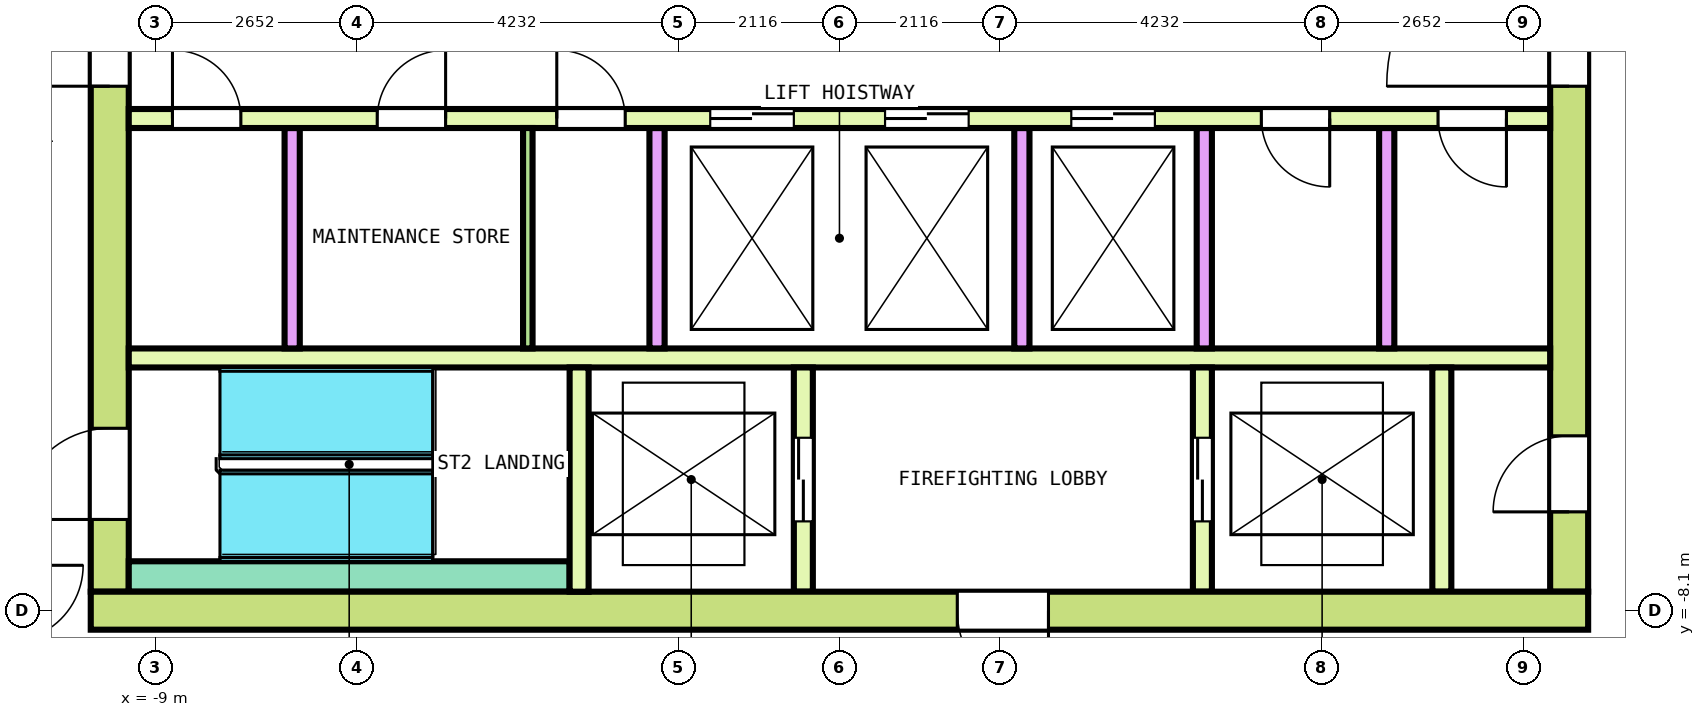
"""IFC4 building model, lengths in metres.
Left out: names, types, materials, properties, quantities, classifications, styles, units other than length and angle.
Written with IfcOpenShell. Run it as: python <this file> out.ifc"""

import sys

from ifc_helpers import new_model, si_unit, direction, frame, frame_2d, origin, place, context, subcontext, project, spatial, rectangle, extrude, element, fill, save


model = new_model("IFC4")
c1 = context("Model", 3, precision=1e-05, world=origin(), true_north=direction((0.0, 1.0)))
c2 = subcontext(c1, "Body", "Model", "MODEL_VIEW")
j1 = project(units=[si_unit("LENGTHUNIT", "METRE"), si_unit("PLANEANGLEUNIT", "RADIAN")], contexts=[c1])
p1 = place(None, origin())
s1 = spatial("IfcSite", under=j1, at=p1, CompositionType="ELEMENT")
p2 = place(p1, origin())
s2 = spatial("IfcBuilding", under=s1, at=p2, CompositionType="ELEMENT")
p3 = place(p2, frame((0.0, 0.0, 308.6)))
s3 = spatial("IfcBuildingStorey", under=s2, at=p3, CompositionType="ELEMENT", Elevation=308.6)
p4 = place(p3, frame((-9.85, -8.1, 0.0), z_axis=(0.0, 0.0, 1.0), x_axis=(1.0, 0.0, 0.0)))
e1 = element("IfcWall", 1, at=p4, inside=s3, PredefinedType="SHEAR", context=c2, shape_type="SweptSolid", body=[
    extrude(rectangle(XDim=19.7, YDim=0.5, at=frame_2d((9.85, 0.0))), origin(), (0.0, 0.0, 1.0), 3.7),
])
p5 = place(p4, frame((11.4, 0.0, 0.0)))
e2 = element("IfcOpeningElement", 2, at=p5, cuts=e1, PredefinedType="OPENING", context=c2, shape_type="SweptSolid", body=[
    extrude(rectangle(XDim=1.2, YDim=2.1, at=frame_2d((0.6, 1.05))), frame((0.0, 0.26, 0.0), z_axis=(0.0, -1.0, 0.0), x_axis=(1.0, 0.0, 0.0)), (0.0, 0.0, 1.0), 0.52),
])
p6 = place(p3, frame((-9.6, -7.85, 0.0), z_axis=(0.0, 0.0, 1.0), x_axis=(0.0, 1.0, 0.0)))
e3 = element("IfcWall", 3, at=p6, inside=s3, PredefinedType="SHEAR", context=c2, shape_type="SweptSolid", body=[
    extrude(rectangle(XDim=15.7, YDim=0.5, at=frame_2d((7.85, 0.0))), origin(), (0.0, 0.0, 1.0), 3.7),
])
p7 = place(p6, frame((6.65, 0.0, 0.0)))
e4 = element("IfcOpeningElement", 4, at=p7, cuts=e3, PredefinedType="OPENING", context=c2, shape_type="SweptSolid", body=[
    extrude(rectangle(XDim=2.4, YDim=2.1, at=frame_2d((1.2, 1.05))), frame((0.0, 0.26, 0.0), z_axis=(0.0, -1.0, 0.0), x_axis=(1.0, 0.0, 0.0)), (0.0, 0.0, 1.0), 0.52),
])
p8 = place(p6, frame((13.55, 0.0, 0.0)))
e5 = element("IfcOpeningElement", 5, at=p8, cuts=e3, PredefinedType="OPENING", context=c2, shape_type="SweptSolid", body=[
    extrude(rectangle(XDim=1.2, YDim=2.1, at=frame_2d((0.6, 1.05))), frame((0.0, 0.26, 0.0), z_axis=(0.0, -1.0, 0.0), x_axis=(1.0, 0.0, 0.0)), (0.0, 0.0, 1.0), 0.52),
])
p9 = place(p6, frame((0.95, 0.0, 0.0)))
e6 = element("IfcOpeningElement", 6, at=p9, cuts=e3, PredefinedType="OPENING", context=c2, shape_type="SweptSolid", body=[
    extrude(rectangle(XDim=1.2, YDim=2.1, at=frame_2d((0.6, 1.05))), frame((0.0, 0.26, 0.0), z_axis=(0.0, -1.0, 0.0), x_axis=(1.0, 0.0, 0.0)), (0.0, 0.0, 1.0), 0.52),
])
p10 = place(p3, frame((9.6, -7.85, 0.0), z_axis=(0.0, 0.0, 1.0), x_axis=(0.0, 1.0, 0.0)))
e7 = element("IfcWall", 7, at=p10, inside=s3, PredefinedType="SHEAR", context=c2, shape_type="SweptSolid", body=[
    extrude(rectangle(XDim=15.7, YDim=0.5, at=frame_2d((7.85, 0.0))), origin(), (0.0, 0.0, 1.0), 3.7),
])
p11 = place(p10, frame((6.65, 0.0, 0.0)))
e8 = element("IfcOpeningElement", 8, at=p11, cuts=e7, PredefinedType="OPENING", context=c2, shape_type="SweptSolid", body=[
    extrude(rectangle(XDim=2.4, YDim=2.1, at=frame_2d((1.2, 1.05))), frame((0.0, 0.26, 0.0), z_axis=(0.0, -1.0, 0.0), x_axis=(1.0, 0.0, 0.0)), (0.0, 0.0, 1.0), 0.52),
])
p12 = place(p10, frame((13.55, 0.0, 0.0)))
e9 = element("IfcOpeningElement", 9, at=p12, cuts=e7, PredefinedType="OPENING", context=c2, shape_type="SweptSolid", body=[
    extrude(rectangle(XDim=1.2, YDim=2.1, at=frame_2d((0.6, 1.05))), frame((0.0, 0.26, 0.0), z_axis=(0.0, -1.0, 0.0), x_axis=(1.0, 0.0, 0.0)), (0.0, 0.0, 1.0), 0.52),
])
p13 = place(p10, frame((1.05, 0.0, 0.0)))
e10 = element("IfcOpeningElement", 10, at=p13, cuts=e7, PredefinedType="OPENING", context=c2, shape_type="SweptSolid", body=[
    extrude(rectangle(XDim=1.0, YDim=2.1, at=frame_2d((0.5, 1.05))), frame((0.0, 0.26, 0.0), z_axis=(0.0, -1.0, 0.0), x_axis=(1.0, 0.0, 0.0)), (0.0, 0.0, 1.0), 0.52),
])
p14 = place(p3, frame((-9.35, -1.625, 0.0), z_axis=(0.0, 0.0, 1.0), x_axis=(1.0, 0.0, 0.0)))
e11 = element("IfcWall", 11, at=p14, inside=s3, PredefinedType="SOLIDWALL", context=c2, shape_type="SweptSolid", body=[
    extrude(rectangle(XDim=18.7, YDim=0.25, at=frame_2d((9.35, 0.0))), origin(), (0.0, 0.0, 1.0), 3.7),
])
p15 = place(p14, frame((7.65, 0.0, 0.0)))
e12 = element("IfcOpeningElement", 12, at=p15, cuts=e11, PredefinedType="OPENING", context=c2, shape_type="SweptSolid", body=[
    extrude(rectangle(XDim=1.1, YDim=2.1, at=frame_2d((0.55, 1.05))), frame((0.0, 0.135, 0.0), z_axis=(0.0, -1.0, 0.0), x_axis=(1.0, 0.0, 0.0)), (0.0, 0.0, 1.0), 0.27),
])
p16 = place(p14, frame((9.95, 0.0, 0.0)))
e13 = element("IfcOpeningElement", 13, at=p16, cuts=e11, PredefinedType="OPENING", context=c2, shape_type="SweptSolid", body=[
    extrude(rectangle(XDim=1.1, YDim=2.1, at=frame_2d((0.55, 1.05))), frame((0.0, 0.135, 0.0), z_axis=(0.0, -1.0, 0.0), x_axis=(1.0, 0.0, 0.0)), (0.0, 0.0, 1.0), 0.27),
])
p17 = place(p14, frame((12.4, 0.0, 0.0)))
e14 = element("IfcOpeningElement", 14, at=p17, cuts=e11, PredefinedType="OPENING", context=c2, shape_type="SweptSolid", body=[
    extrude(rectangle(XDim=1.1, YDim=2.1, at=frame_2d((0.55, 1.05))), frame((0.0, 0.135, 0.0), z_axis=(0.0, -1.0, 0.0), x_axis=(1.0, 0.0, 0.0)), (0.0, 0.0, 1.0), 0.27),
])
p18 = place(p14, frame((0.575, 0.0, 0.0)))
e15 = element("IfcOpeningElement", 15, at=p18, cuts=e11, PredefinedType="OPENING", context=c2, shape_type="SweptSolid", body=[
    extrude(rectangle(XDim=0.9, YDim=2.1, at=frame_2d((0.45, 1.05))), frame((0.0, 0.135, 0.0), z_axis=(0.0, -1.0, 0.0), x_axis=(1.0, 0.0, 0.0)), (0.0, 0.0, 1.0), 0.27),
])
p19 = place(p14, frame((3.269, 0.0, 0.0)))
e16 = element("IfcOpeningElement", 16, at=p19, cuts=e11, PredefinedType="OPENING", context=c2, shape_type="SweptSolid", body=[
    extrude(rectangle(XDim=0.9, YDim=2.1, at=frame_2d((0.45, 1.05))), frame((0.0, 0.135, 0.0), z_axis=(0.0, -1.0, 0.0), x_axis=(1.0, 0.0, 0.0)), (0.0, 0.0, 1.0), 0.27),
])
p20 = place(p14, frame((5.631, 0.0, 0.0)))
e17 = element("IfcOpeningElement", 17, at=p20, cuts=e11, PredefinedType="OPENING", context=c2, shape_type="SweptSolid", body=[
    extrude(rectangle(XDim=0.9, YDim=2.1, at=frame_2d((0.45, 1.05))), frame((0.0, 0.135, 0.0), z_axis=(0.0, -1.0, 0.0), x_axis=(1.0, 0.0, 0.0)), (0.0, 0.0, 1.0), 0.27),
])
p21 = place(p14, frame((14.9, 0.0, 0.0)))
e18 = element("IfcOpeningElement", 18, at=p21, cuts=e11, PredefinedType="OPENING", context=c2, shape_type="SweptSolid", body=[
    extrude(rectangle(XDim=0.9, YDim=2.1, at=frame_2d((0.45, 1.05))), frame((0.0, 0.135, 0.0), z_axis=(0.0, -1.0, 0.0), x_axis=(1.0, 0.0, 0.0)), (0.0, 0.0, 1.0), 0.27),
])
p22 = place(p14, frame((17.225, 0.0, 0.0)))
e19 = element("IfcOpeningElement", 19, at=p22, cuts=e11, PredefinedType="OPENING", context=c2, shape_type="SweptSolid", body=[
    extrude(rectangle(XDim=0.9, YDim=2.1, at=frame_2d((0.45, 1.05))), frame((0.0, 0.135, 0.0), z_axis=(0.0, -1.0, 0.0), x_axis=(1.0, 0.0, 0.0)), (0.0, 0.0, 1.0), 0.27),
])
p23 = place(p3, frame((-9.35, -4.775, 0.0), z_axis=(0.0, 0.0, 1.0), x_axis=(1.0, 0.0, 0.0)))
e20 = element("IfcWall", 20, at=p23, inside=s3, PredefinedType="SOLIDWALL", context=c2, shape_type="SweptSolid", body=[
    extrude(rectangle(XDim=18.7, YDim=0.25, at=frame_2d((9.35, 0.0))), origin(), (0.0, 0.0, 1.0), 3.7),
])
for number, where, z_axis, x_axis in (
    (21, (-7.2, -4.65, 0.0), (0.0, 0.0, 1.0), (0.0, 1.0, 0.0)),
    (22, (-2.4, -4.65, 0.0), (0.0, 0.0, 1.0), (0.0, 1.0, 0.0)),
    (23, (2.4, -4.65, 0.0), (0.0, 0.0, 1.0), (0.0, 1.0, 0.0)),
    (24, (4.8, -4.65, 0.0), (0.0, 0.0, 1.0), (0.0, 1.0, 0.0)),
    (25, (7.2, -4.65, 0.0), (0.0, 0.0, 1.0), (0.0, 1.0, 0.0)),
):
    element("IfcWall", number, at=place(p3, frame(where, z_axis=z_axis, x_axis=x_axis)), inside=s3, PredefinedType="SOLIDWALL", context=c2, shape_type="SweptSolid", body=[
        extrude(rectangle(XDim=2.9, YDim=0.2, at=frame_2d((1.45, 0.0))), origin(), (0.0, 0.0, 1.0), 3.7),
    ])
p24 = place(p3, frame((-9.35, -7.65, 0.0), z_axis=(0.0, 0.0, 1.0), x_axis=(1.0, 0.0, 0.0)))
e26 = element("IfcWall", 26, at=p24, inside=s3, PredefinedType="SOLIDWALL", context=c2, shape_type="SweptSolid", body=[
    extrude(rectangle(XDim=5.8, YDim=0.4, at=frame_2d((2.9, 0.0))), origin(), (0.0, 0.0, 1.0), 3.7),
])
p25 = place(p3, frame((-3.425, -7.85, 0.0), z_axis=(0.0, 0.0, 1.0), x_axis=(0.0, 1.0, 0.0)))
e27 = element("IfcWall", 27, at=p25, inside=s3, PredefinedType="SOLIDWALL", context=c2, shape_type="SweptSolid", body=[
    extrude(rectangle(XDim=2.95, YDim=0.25, at=frame_2d((1.475, 0.0))), origin(), (0.0, 0.0, 1.0), 3.7),
])
p26 = place(p3, frame((-0.475, -7.85, 0.0), z_axis=(0.0, 0.0, 1.0), x_axis=(0.0, 1.0, 0.0)))
e28 = element("IfcWall", 28, at=p26, inside=s3, PredefinedType="SOLIDWALL", context=c2, shape_type="SweptSolid", body=[
    extrude(rectangle(XDim=2.95, YDim=0.25, at=frame_2d((1.475, 0.0))), origin(), (0.0, 0.0, 1.0), 3.7),
])
p27 = place(p26, frame((0.925, 0.0, 0.0)))
e29 = element("IfcOpeningElement", 29, at=p27, cuts=e28, PredefinedType="OPENING", context=c2, shape_type="SweptSolid", body=[
    extrude(rectangle(XDim=1.1, YDim=2.1, at=frame_2d((0.55, 1.05))), frame((0.0, 0.135, 0.0), z_axis=(0.0, -1.0, 0.0), x_axis=(1.0, 0.0, 0.0)), (0.0, 0.0, 1.0), 0.27),
])
p28 = place(p3, frame((4.775, -7.85, 0.0), z_axis=(0.0, 0.0, 1.0), x_axis=(0.0, 1.0, 0.0)))
e30 = element("IfcWall", 30, at=p28, inside=s3, PredefinedType="SOLIDWALL", context=c2, shape_type="SweptSolid", body=[
    extrude(rectangle(XDim=2.95, YDim=0.25, at=frame_2d((1.475, 0.0))), origin(), (0.0, 0.0, 1.0), 3.7),
])
p29 = place(p28, frame((0.925, 0.0, 0.0)))
e31 = element("IfcOpeningElement", 31, at=p29, cuts=e30, PredefinedType="OPENING", context=c2, shape_type="SweptSolid", body=[
    extrude(rectangle(XDim=1.1, YDim=2.1, at=frame_2d((0.55, 1.05))), frame((0.0, 0.135, 0.0), z_axis=(0.0, -1.0, 0.0), x_axis=(1.0, 0.0, 0.0)), (0.0, 0.0, 1.0), 0.27),
])
p30 = place(p3, frame((7.925, -7.85, 0.0), z_axis=(0.0, 0.0, 1.0), x_axis=(0.0, 1.0, 0.0)))
e32 = element("IfcWall", 32, at=p30, inside=s3, PredefinedType="SOLIDWALL", context=c2, shape_type="SweptSolid", body=[
    extrude(rectangle(XDim=2.95, YDim=0.25, at=frame_2d((1.475, 0.0))), origin(), (0.0, 0.0, 1.0), 3.7),
])
p31 = place(p3, frame((-4.1, -4.65, 0.0), z_axis=(0.0, 0.0, 1.0), x_axis=(0.0, 1.0, 0.0)))
e33 = element("IfcWall", 33, at=p31, inside=s3, PredefinedType="PARTITIONING", context=c2, shape_type="SweptSolid", body=[
    extrude(rectangle(XDim=2.9, YDim=0.125, at=frame_2d((1.45, 0.0))), origin(), (0.0, 0.0, 1.0), 3.7),
])
p32 = place(p15, origin())
e34 = element("IfcDoor", 34, at=p32, inside=s3, OperationType="DOUBLE_DOOR_SLIDING", PredefinedType="DOOR", context=c2, shape_type="SweptSolid", body=[
    extrude(rectangle(XDim=1.1, YDim=2.1, at=frame_2d((0.55, 1.05))), frame((0.0, 0.075, 0.0), z_axis=(0.0, -1.0, 0.0), x_axis=(1.0, 0.0, 0.0)), (0.0, 0.0, 1.0), 0.15),
])
fill(e12, e34)
p33 = place(p16, origin())
e35 = element("IfcDoor", 35, at=p33, inside=s3, OperationType="DOUBLE_DOOR_SLIDING", PredefinedType="DOOR", context=c2, shape_type="SweptSolid", body=[
    extrude(rectangle(XDim=1.1, YDim=2.1, at=frame_2d((0.55, 1.05))), frame((0.0, 0.075, 0.0), z_axis=(0.0, -1.0, 0.0), x_axis=(1.0, 0.0, 0.0)), (0.0, 0.0, 1.0), 0.15),
])
fill(e13, e35)
p34 = place(p17, origin())
e36 = element("IfcDoor", 36, at=p34, inside=s3, OperationType="DOUBLE_DOOR_SLIDING", PredefinedType="DOOR", context=c2, shape_type="SweptSolid", body=[
    extrude(rectangle(XDim=1.1, YDim=2.1, at=frame_2d((0.55, 1.05))), frame((0.0, 0.075, 0.0), z_axis=(0.0, -1.0, 0.0), x_axis=(1.0, 0.0, 0.0)), (0.0, 0.0, 1.0), 0.15),
])
fill(e14, e36)
p35 = place(p27, origin())
e37 = element("IfcDoor", 37, at=p35, inside=s3, OperationType="DOUBLE_DOOR_SLIDING", PredefinedType="DOOR", context=c2, shape_type="SweptSolid", body=[
    extrude(rectangle(XDim=1.1, YDim=2.1, at=frame_2d((0.55, 1.05))), frame((0.0, 0.075, 0.0), z_axis=(0.0, -1.0, 0.0), x_axis=(1.0, 0.0, 0.0)), (0.0, 0.0, 1.0), 0.15),
])
fill(e29, e37)
p36 = place(p29, origin())
e38 = element("IfcDoor", 38, at=p36, inside=s3, OperationType="DOUBLE_DOOR_SLIDING", PredefinedType="DOOR", context=c2, shape_type="SweptSolid", body=[
    extrude(rectangle(XDim=1.1, YDim=2.1, at=frame_2d((0.55, 1.05))), frame((0.0, 0.075, 0.0), z_axis=(0.0, -1.0, 0.0), x_axis=(1.0, 0.0, 0.0)), (0.0, 0.0, 1.0), 0.15),
])
fill(e31, e38)
p37 = place(p7, origin())
e39 = element("IfcDoor", 39, at=p37, inside=s3, OperationType="DOUBLE_DOOR_SINGLE_SWING", PredefinedType="DOOR", context=c2, shape_type="SweptSolid", body=[
    extrude(rectangle(XDim=2.4, YDim=2.1, at=frame_2d((1.2, 1.05))), frame((0.0, 0.2, 0.0), z_axis=(0.0, -1.0, 0.0), x_axis=(1.0, 0.0, 0.0)), (0.0, 0.0, 1.0), 0.4),
])
fill(e4, e39)
p38 = place(p11, origin())
e40 = element("IfcDoor", 40, at=p38, inside=s3, OperationType="DOUBLE_DOOR_SINGLE_SWING", PredefinedType="DOOR", context=c2, shape_type="SweptSolid", body=[
    extrude(rectangle(XDim=2.4, YDim=2.1, at=frame_2d((1.2, 1.05))), frame((0.0, 0.2, 0.0), z_axis=(0.0, -1.0, 0.0), x_axis=(1.0, 0.0, 0.0)), (0.0, 0.0, 1.0), 0.4),
])
fill(e8, e40)
p39 = place(p9, origin())
e41 = element("IfcDoor", 41, at=p39, inside=s3, OperationType="SINGLE_SWING_RIGHT", PredefinedType="DOOR", context=c2, shape_type="SweptSolid", body=[
    extrude(rectangle(XDim=1.2, YDim=2.1, at=frame_2d((0.6, 1.05))), frame((0.0, 0.2, 0.0), z_axis=(0.0, -1.0, 0.0), x_axis=(1.0, 0.0, 0.0)), (0.0, 0.0, 1.0), 0.4),
])
fill(e6, e41)
p40 = place(p5, origin())
e42 = element("IfcDoor", 42, at=p40, inside=s3, OperationType="SINGLE_SWING_RIGHT", PredefinedType="DOOR", context=c2, shape_type="SweptSolid", body=[
    extrude(rectangle(XDim=1.2, YDim=2.1, at=frame_2d((0.6, 1.05))), frame((0.0, 0.2, 0.0), z_axis=(0.0, -1.0, 0.0), x_axis=(1.0, 0.0, 0.0)), (0.0, 0.0, 1.0), 0.4),
])
fill(e2, e42)
p41 = place(p13, origin())
e43 = element("IfcDoor", 43, at=p41, inside=s3, OperationType="SINGLE_SWING_RIGHT", PredefinedType="DOOR", context=c2, shape_type="SweptSolid", body=[
    extrude(rectangle(XDim=1.0, YDim=2.1, at=frame_2d((0.5, 1.05))), frame((0.0, 0.2, 0.0), z_axis=(0.0, -1.0, 0.0), x_axis=(1.0, 0.0, 0.0)), (0.0, 0.0, 1.0), 0.4),
])
fill(e10, e43)
p42 = place(p18, origin())
e44 = element("IfcDoor", 44, at=p42, inside=s3, OperationType="SINGLE_SWING_LEFT", PredefinedType="DOOR", context=c2, shape_type="SweptSolid", body=[
    extrude(rectangle(XDim=0.9, YDim=2.1, at=frame_2d((0.45, 1.05))), frame((0.0, 0.075, 0.0), z_axis=(0.0, -1.0, 0.0), x_axis=(1.0, 0.0, 0.0)), (0.0, 0.0, 1.0), 0.15),
])
fill(e15, e44)
p43 = place(p19, origin())
e45 = element("IfcDoor", 45, at=p43, inside=s3, OperationType="SINGLE_SWING_RIGHT", PredefinedType="DOOR", context=c2, shape_type="SweptSolid", body=[
    extrude(rectangle(XDim=0.9, YDim=2.1, at=frame_2d((0.45, 1.05))), frame((0.0, 0.075, 0.0), z_axis=(0.0, -1.0, 0.0), x_axis=(1.0, 0.0, 0.0)), (0.0, 0.0, 1.0), 0.15),
])
fill(e16, e45)
p44 = place(p20, origin())
e46 = element("IfcDoor", 46, at=p44, inside=s3, OperationType="SINGLE_SWING_LEFT", PredefinedType="DOOR", context=c2, shape_type="SweptSolid", body=[
    extrude(rectangle(XDim=0.9, YDim=2.1, at=frame_2d((0.45, 1.05))), frame((0.0, 0.075, 0.0), z_axis=(0.0, -1.0, 0.0), x_axis=(1.0, 0.0, 0.0)), (0.0, 0.0, 1.0), 0.15),
])
fill(e17, e46)
p45 = place(p21, origin())
e47 = element("IfcDoor", 47, at=p45, inside=s3, OperationType="SINGLE_SWING_RIGHT", PredefinedType="DOOR", context=c2, shape_type="SweptSolid", body=[
    extrude(rectangle(XDim=0.9, YDim=2.1, at=frame_2d((0.45, 1.05))), frame((0.0, 0.075, 0.0), z_axis=(0.0, -1.0, 0.0), x_axis=(1.0, 0.0, 0.0)), (0.0, 0.0, 1.0), 0.15),
])
fill(e18, e47)
p46 = place(p22, origin())
e48 = element("IfcDoor", 48, at=p46, inside=s3, OperationType="SINGLE_SWING_LEFT", PredefinedType="DOOR", context=c2, shape_type="SweptSolid", body=[
    extrude(rectangle(XDim=0.9, YDim=2.1, at=frame_2d((0.45, 1.05))), frame((0.0, 0.075, 0.0), z_axis=(0.0, -1.0, 0.0), x_axis=(1.0, 0.0, 0.0)), (0.0, 0.0, 1.0), 0.15),
])
fill(e19, e48)
save(model, sys.argv[1])
